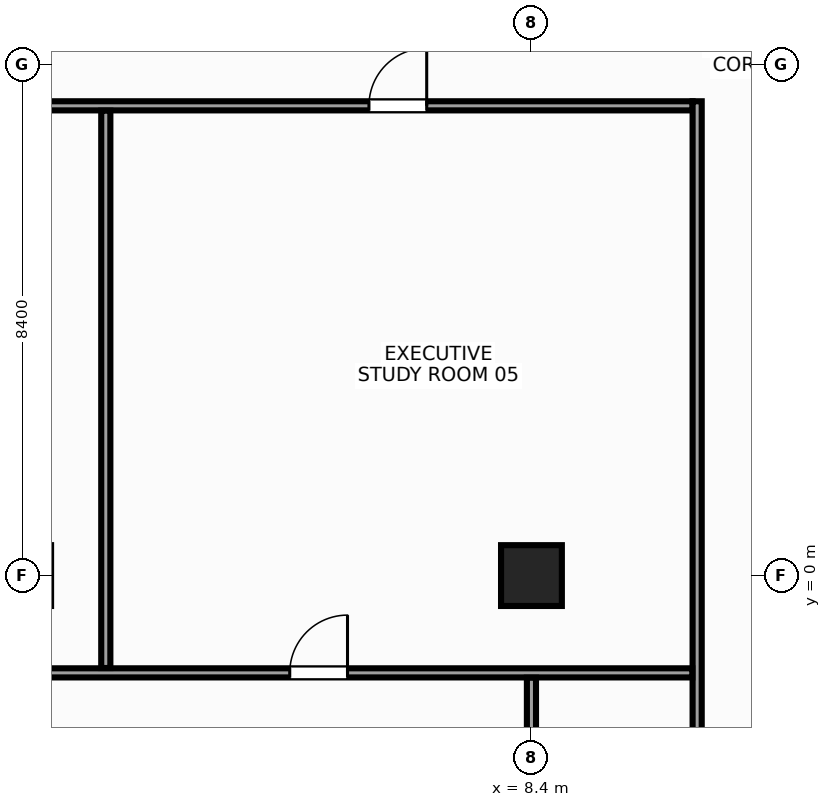
"""IFC4 building model, lengths in metres.
Left out: names, types, materials, properties, quantities, classifications, styles, units other than length and angle.
Written with IfcOpenShell. Run it as: python <this file> out.ifc"""

import sys

from ifc_helpers import new_model, si_unit, direction, frame, frame_2d, origin, origin_2d, place, context, subcontext, project, spatial, rectangle, hollow_rectangle, extrude, source, transform, mapped, element, fill, save


model = new_model("IFC4")
c1 = context("Model", 3, precision=1e-05, world=origin(), true_north=direction((0.0, 1.0)))
c2 = subcontext(c1, "Body", "Model", "MODEL_VIEW")
j1 = project(units=[si_unit("LENGTHUNIT", "METRE"), si_unit("PLANEANGLEUNIT", "RADIAN")], contexts=[c1])
p1 = place(None, origin())
s1 = spatial("IfcSite", under=j1, at=p1, CompositionType="ELEMENT")
p2 = place(p1, origin())
s2 = spatial("IfcBuilding", under=s1, at=p2, CompositionType="ELEMENT")
p3 = place(p2, frame((0.0, 0.0, 153.2)))
s3 = spatial("IfcBuildingStorey", under=s2, at=p3, CompositionType="ELEMENT", Elevation=153.2)
m1 = source(origin(), c2, "Body", "SweptSolid", [
    extrude(hollow_rectangle(XDim=1.0, YDim=1.0, WallThickness=0.045, at=origin_2d()), origin(), (0.0, 0.0, 1.0), 3.6),
])
p4 = place(p3, frame((8.4, 0.0, 0.0), z_axis=(0.0, 0.0, 1.0), x_axis=(1.0, 0.0, 0.0)))
e1 = element("IfcColumn", 1, at=p4, inside=s3, PredefinedType="COLUMN", context=c2, shape_type="MappedRepresentation", body=[
    mapped(m1, transform((0.0, 0.0, 0.0), x_axis=(1.0, 0.0, 0.0), y_axis=(0.0, 1.0, 0.0), z_axis=(0.0, 0.0, 1.0), scale=1.0)),
])
m2 = source(origin(), c2, "Body", "SweptSolid", [
    extrude(rectangle(XDim=31.6, YDim=0.15, at=frame_2d((15.8, 0.0))), origin(), (0.0, 0.0, 1.0), 2.765),
])
p5 = place(p3, frame((-20.55, 7.725, 0.0), z_axis=(0.0, 0.0, 1.0), x_axis=(1.0, 0.0, 0.0)))
e2 = element("IfcWall", 2, at=p5, inside=s3, PredefinedType="PARTITIONING", context=c2, shape_type="MappedRepresentation", body=[
    mapped(m2, transform((0.0, 0.0, 0.0), x_axis=(1.0, 0.0, 0.0), y_axis=(0.0, 1.0, 0.0), z_axis=(0.0, 0.0, 1.0), scale=1.0)),
])
p6 = place(p5, frame((0.722, 0.0, 0.0)))
e3 = element("IfcOpeningElement", 3, at=p6, cuts=e2, PredefinedType="OPENING", context=c2, shape_type="SweptSolid", body=[
    extrude(rectangle(XDim=0.95, YDim=2.15, at=frame_2d((0.475, 1.075))), frame((0.0, 0.087, 0.0), z_axis=(0.0, -1.0, 0.0), x_axis=(1.0, 0.0, 0.0)), (0.0, 0.0, 1.0), 0.174),
])
p7 = place(p5, frame((6.075, 0.0, 0.0)))
e4 = element("IfcOpeningElement", 4, at=p7, cuts=e2, PredefinedType="OPENING", context=c2, shape_type="SweptSolid", body=[
    extrude(rectangle(XDim=0.95, YDim=2.15, at=frame_2d((0.475, 1.075))), frame((0.0, 0.087, 0.0), z_axis=(0.0, -1.0, 0.0), x_axis=(1.0, 0.0, 0.0)), (0.0, 0.0, 1.0), 0.174),
])
p8 = place(p5, frame((15.875, 0.0, 0.0)))
e5 = element("IfcOpeningElement", 5, at=p8, cuts=e2, PredefinedType="OPENING", context=c2, shape_type="SweptSolid", body=[
    extrude(rectangle(XDim=0.95, YDim=2.15, at=frame_2d((0.475, 1.075))), frame((0.0, 0.087, 0.0), z_axis=(0.0, -1.0, 0.0), x_axis=(1.0, 0.0, 0.0)), (0.0, 0.0, 1.0), 0.174),
])
p9 = place(p5, frame((26.278, 0.0, 0.0)))
e6 = element("IfcOpeningElement", 6, at=p9, cuts=e2, PredefinedType="OPENING", context=c2, shape_type="SweptSolid", body=[
    extrude(rectangle(XDim=0.95, YDim=2.15, at=frame_2d((0.475, 1.075))), frame((0.0, 0.087, 0.0), z_axis=(0.0, -1.0, 0.0), x_axis=(1.0, 0.0, 0.0)), (0.0, 0.0, 1.0), 0.174),
])
m3 = source(origin(), c2, "Body", "SweptSolid", [
    extrude(rectangle(XDim=22.595, YDim=0.15, at=frame_2d((11.297, 0.0))), origin(), (0.0, 0.0, 1.0), 2.665),
])
p10 = place(p3, frame((11.125, -14.795, 0.0), z_axis=(0.0, 0.0, 1.0), x_axis=(0.0, 1.0, 0.0)))
e7 = element("IfcWall", 7, at=p10, inside=s3, PredefinedType="PARTITIONING", context=c2, shape_type="MappedRepresentation", body=[
    mapped(m3, transform((0.0, 0.0, 0.0), x_axis=(1.0, 0.0, 0.0), y_axis=(0.0, 1.0, 0.0), z_axis=(0.0, 0.0, 1.0), scale=1.0)),
])
m4 = source(origin(), c2, "Body", "SweptSolid", [
    extrude(rectangle(XDim=34.895, YDim=0.15, at=frame_2d((17.448, 0.0))), origin(), (0.0, 0.0, 1.0), 2.765),
])
p11 = place(p3, frame((-23.85, -1.6, 0.0), z_axis=(0.0, 0.0, 1.0), x_axis=(1.0, 0.0, 0.0)))
e8 = element("IfcWall", 8, at=p11, inside=s3, PredefinedType="PARTITIONING", context=c2, shape_type="MappedRepresentation", body=[
    mapped(m4, transform((0.0, 0.0, 0.0), x_axis=(1.0, 0.0, 0.0), y_axis=(0.0, 1.0, 0.0), z_axis=(0.0, 0.0, 1.0), scale=1.0)),
])
p12 = place(p11, frame((3.913, 0.0, 0.0)))
e9 = element("IfcOpeningElement", 9, at=p12, cuts=e8, PredefinedType="OPENING", context=c2, shape_type="SweptSolid", body=[
    extrude(rectangle(XDim=0.95, YDim=2.15, at=frame_2d((0.475, 1.075))), frame((0.0, 0.087, 0.0), z_axis=(0.0, -1.0, 0.0), x_axis=(1.0, 0.0, 0.0)), (0.0, 0.0, 1.0), 0.174),
])
p13 = place(p11, frame((9.675, 0.0, 0.0)))
e10 = element("IfcOpeningElement", 10, at=p13, cuts=e8, PredefinedType="OPENING", context=c2, shape_type="SweptSolid", body=[
    extrude(rectangle(XDim=0.95, YDim=2.15, at=frame_2d((0.475, 1.075))), frame((0.0, 0.087, 0.0), z_axis=(0.0, -1.0, 0.0), x_axis=(1.0, 0.0, 0.0)), (0.0, 0.0, 1.0), 0.174),
])
p14 = place(p11, frame((19.175, 0.0, 0.0)))
e11 = element("IfcOpeningElement", 11, at=p14, cuts=e8, PredefinedType="OPENING", context=c2, shape_type="SweptSolid", body=[
    extrude(rectangle(XDim=0.95, YDim=2.15, at=frame_2d((0.475, 1.075))), frame((0.0, 0.087, 0.0), z_axis=(0.0, -1.0, 0.0), x_axis=(1.0, 0.0, 0.0)), (0.0, 0.0, 1.0), 0.174),
])
p15 = place(p11, frame((28.275, 0.0, 0.0)))
e12 = element("IfcOpeningElement", 12, at=p15, cuts=e8, PredefinedType="OPENING", context=c2, shape_type="SweptSolid", body=[
    extrude(rectangle(XDim=0.95, YDim=2.15, at=frame_2d((0.475, 1.075))), frame((0.0, 0.087, 0.0), z_axis=(0.0, -1.0, 0.0), x_axis=(1.0, 0.0, 0.0)), (0.0, 0.0, 1.0), 0.174),
])
m5 = source(origin(), c2, "Body", "SweptSolid", [
    extrude(rectangle(XDim=9.165, YDim=0.15, at=frame_2d((4.583, 0.0))), origin(), (0.0, 0.0, 1.0), 2.665),
])
p16 = place(p3, frame((1.4, -1.52, 0.0), z_axis=(0.0, 0.0, 1.0), x_axis=(0.0, 1.0, 0.0)))
e13 = element("IfcWall", 13, at=p16, inside=s3, PredefinedType="PARTITIONING", context=c2, shape_type="MappedRepresentation", body=[
    mapped(m5, transform((0.0, 0.0, 0.0), x_axis=(1.0, 0.0, 0.0), y_axis=(0.0, 1.0, 0.0), z_axis=(0.0, 0.0, 1.0), scale=1.0)),
])
m6 = source(origin(), c2, "Body", "SweptSolid", [
    extrude(rectangle(XDim=8.61, YDim=0.15, at=frame_2d((4.305, 0.0))), origin(), (0.0, 0.0, 1.0), 2.765),
])
p17 = place(p3, frame((8.4, -10.29, 0.0), z_axis=(0.0, 0.0, 1.0), x_axis=(0.0, 1.0, 0.0)))
e14 = element("IfcWall", 14, at=p17, inside=s3, PredefinedType="PARTITIONING", context=c2, shape_type="MappedRepresentation", body=[
    mapped(m6, transform((0.0, 0.0, 0.0), x_axis=(1.0, 0.0, 0.0), y_axis=(0.0, 1.0, 0.0), z_axis=(0.0, 0.0, 1.0), scale=1.0)),
])
m7 = source(origin(), c2, "Body", "SweptSolid", [
    extrude(rectangle(XDim=0.95, YDim=2.15, at=frame_2d((0.475, 1.075))), frame((0.0, 0.025, 0.0), z_axis=(0.0, -1.0, 0.0), x_axis=(1.0, 0.0, 0.0)), (0.0, 0.0, 1.0), 0.05),
])
p18 = place(p9, origin())
e15 = element("IfcDoor", 15, at=p18, inside=s3, OperationType="SINGLE_SWING_RIGHT", PredefinedType="DOOR", context=c2, shape_type="MappedRepresentation", body=[
    mapped(m7, transform((0.0, 0.0, 0.0), x_axis=(1.0, 0.0, 0.0), y_axis=(0.0, 1.0, 0.0), z_axis=(0.0, 0.0, 1.0), scale=1.0)),
])
fill(e6, e15)
p19 = place(p15, origin())
e16 = element("IfcDoor", 16, at=p19, inside=s3, OperationType="SINGLE_SWING_RIGHT", PredefinedType="DOOR", context=c2, shape_type="MappedRepresentation", body=[
    mapped(m7, transform((0.0, 0.0, 0.0), x_axis=(1.0, 0.0, 0.0), y_axis=(0.0, 1.0, 0.0), z_axis=(0.0, 0.0, 1.0), scale=1.0)),
])
fill(e12, e16)
save(model, sys.argv[1])
